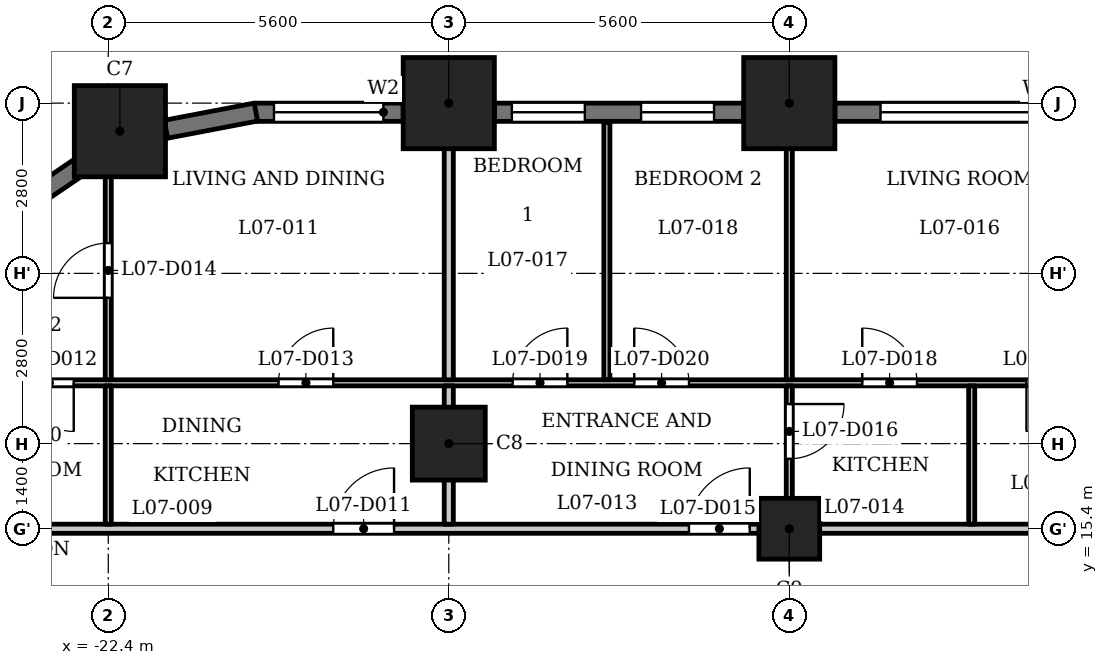
"""IFC4 building model, lengths in metres.
Left out: names, types, materials, properties, quantities, classifications, styles, units other than length and angle.
Written with IfcOpenShell. Run it as: python <this file> out.ifc"""

import sys

from ifc_helpers import new_model, si_unit, direction, frame, frame_2d, origin, origin_2d, place, context, subcontext, project, spatial, rectangle, extrude, element, fill, save


model = new_model("IFC4")
c1 = context("Model", 3, precision=1e-05, world=origin(), true_north=direction((0.0, 1.0)))
c2 = subcontext(c1, "Body", "Model", "MODEL_VIEW")
j1 = project(units=[si_unit("LENGTHUNIT", "METRE"), si_unit("PLANEANGLEUNIT", "RADIAN")], contexts=[c1])
p1 = place(None, origin())
s1 = spatial("IfcSite", under=j1, at=p1, CompositionType="ELEMENT")
p2 = place(p1, origin())
s2 = spatial("IfcBuilding", under=s1, at=p2, CompositionType="ELEMENT")
p3 = place(p2, frame((0.0, 0.0, 34.0)))
s3 = spatial("IfcBuildingStorey", under=s2, at=p3, CompositionType="ELEMENT", Elevation=34.0)
for number, where, z_axis, x_axis in (
    (1, (-11.2, 22.4, 0.0), (0.0, 0.0, 1.0), (1.0, 0.0, 0.0)),
    (2, (-16.8, 22.4, 0.0), (0.0, 0.0, 1.0), (1.0, 0.0, 0.0)),
    (3, (-22.209, 21.938, 0.0), (0.0, 0.0, 1.0), (1.0, 0.0, 0.0)),
):
    element("IfcColumn", number, at=place(p3, frame(where, z_axis=z_axis, x_axis=x_axis)), inside=s3, PredefinedType="COLUMN", context=c2, shape_type="SweptSolid", body=[
        extrude(rectangle(XDim=1.5, YDim=1.5, at=origin_2d()), origin(), (0.0, 0.0, 1.0), 3.5),
    ])
p4 = place(p3, frame((-16.8, 16.8, 0.0), z_axis=(0.0, 0.0, 1.0), x_axis=(1.0, 0.0, 0.0)))
e4 = element("IfcColumn", 4, at=p4, inside=s3, PredefinedType="COLUMN", context=c2, shape_type="SweptSolid", body=[
    extrude(rectangle(XDim=1.2, YDim=1.2, at=origin_2d()), origin(), (0.0, 0.0, 1.0), 3.5),
])
p5 = place(p3, frame((-11.2, 15.4, 0.0), z_axis=(0.0, 0.0, 1.0), x_axis=(1.0, 0.0, 0.0)))
e5 = element("IfcColumn", 5, at=p5, inside=s3, PredefinedType="COLUMN", context=c2, shape_type="SweptSolid", body=[
    extrude(rectangle(XDim=1.0, YDim=1.0, at=origin_2d()), origin(), (0.0, 0.0, 1.0), 3.5),
])
p6 = place(p3, frame((-6.35, 22.25, 0.0), z_axis=(0.0, 0.0, 1.0), x_axis=(-1.0, 0.0, 0.0)))
e6 = element("IfcWall", 6, at=p6, inside=s3, PredefinedType="SOLIDWALL", context=c2, shape_type="SweptSolid", body=[
    extrude(rectangle(XDim=4.1, YDim=0.3, at=frame_2d((2.05, 0.0))), origin(), (0.0, 0.0, 1.0), 2.35),
])
p7 = place(p6, frame((0.75, 0.0, 0.9)))
e7 = element("IfcOpeningElement", 7, at=p7, cuts=e6, PredefinedType="OPENING", context=c2, shape_type="SweptSolid", body=[
    extrude(rectangle(XDim=2.6, YDim=1.25, at=frame_2d((1.3, 0.625))), frame((0.0, 0.16, 0.0), z_axis=(0.0, -1.0, 0.0), x_axis=(1.0, 0.0, 0.0)), (0.0, 0.0, 1.0), 0.32),
])
p8 = place(p3, frame((-11.95, 22.25, 0.0), z_axis=(0.0, 0.0, 1.0), x_axis=(-1.0, 0.0, 0.0)))
e8 = element("IfcWall", 8, at=p8, inside=s3, PredefinedType="SOLIDWALL", context=c2, shape_type="SweptSolid", body=[
    extrude(rectangle(XDim=4.1, YDim=0.3, at=frame_2d((2.05, 0.0))), origin(), (0.0, 0.0, 1.0), 2.35),
])
p9 = place(p8, frame((0.488, 0.0, 0.6)))
e9 = element("IfcOpeningElement", 9, at=p9, cuts=e8, PredefinedType="OPENING", context=c2, shape_type="SweptSolid", body=[
    extrude(rectangle(XDim=1.2, YDim=1.55, at=frame_2d((0.6, 0.775))), frame((0.0, 0.16, 0.0), z_axis=(0.0, -1.0, 0.0), x_axis=(1.0, 0.0, 0.0)), (0.0, 0.0, 1.0), 0.32),
])
p10 = place(p8, frame((2.613, 0.0, 0.6)))
e10 = element("IfcOpeningElement", 10, at=p10, cuts=e8, PredefinedType="OPENING", context=c2, shape_type="SweptSolid", body=[
    extrude(rectangle(XDim=1.2, YDim=1.55, at=frame_2d((0.6, 0.775))), frame((0.0, 0.16, 0.0), z_axis=(0.0, -1.0, 0.0), x_axis=(1.0, 0.0, 0.0)), (0.0, 0.0, 1.0), 0.32),
])
p11 = place(p3, frame((-17.55, 22.25, 0.0), z_axis=(0.0, 0.0, 1.0), x_axis=(-1.0, 0.0, 0.0)))
e11 = element("IfcWall", 11, at=p11, inside=s3, PredefinedType="SOLIDWALL", context=c2, shape_type="SweptSolid", body=[
    extrude(rectangle(XDim=2.45, YDim=0.3, at=frame_2d((1.225, 0.0))), origin(), (0.0, 0.0, 1.0), 2.35),
])
p12 = place(p11, frame((0.325, 0.0, 0.9)))
e12 = element("IfcOpeningElement", 12, at=p12, cuts=e11, PredefinedType="OPENING", context=c2, shape_type="SweptSolid", body=[
    extrude(rectangle(XDim=1.8, YDim=1.25, at=frame_2d((0.9, 0.625))), frame((0.0, 0.16, 0.0), z_axis=(0.0, -1.0, 0.0), x_axis=(1.0, 0.0, 0.0)), (0.0, 0.0, 1.0), 0.32),
])
for number, where, z_axis, x_axis in (
    (13, (-19.972, 22.253, 0.0), (0.0, 0.0, 1.0), (-0.982, -0.187, 0.0)),
    (14, (-22.767, 21.426, 0.0), (0.0, 0.0, 1.0), (-0.827, -0.562, 0.0)),
):
    element("IfcWall", number, at=place(p3, frame(where, z_axis=z_axis, x_axis=x_axis)), inside=s3, PredefinedType="SOLIDWALL", context=c2, shape_type="SweptSolid", body=[
        extrude(rectangle(XDim=1.506, YDim=0.3, at=frame_2d((0.753, 0.0))), origin(), (0.0, 0.0, 1.0), 2.35),
    ])
p13 = place(p3, frame((-27.484, 15.4, 0.0), z_axis=(0.0, 0.0, 1.0), x_axis=(1.0, 0.0, 0.0)))
e15 = element("IfcWall", 15, at=p13, inside=s3, PredefinedType="PARTITIONING", context=c2, shape_type="SweptSolid", body=[
    extrude(rectangle(XDim=54.968, YDim=0.15, at=frame_2d((27.484, 0.0))), origin(), (0.0, 0.0, 1.0), 3.2),
])
p14 = place(p13, frame((8.784, 0.0, 0.0)))
e16 = element("IfcOpeningElement", 16, at=p14, cuts=e15, PredefinedType="OPENING", context=c2, shape_type="SweptSolid", body=[
    extrude(rectangle(XDim=1.0, YDim=2.1, at=frame_2d((0.5, 1.05))), frame((0.0, 0.085, 0.0), z_axis=(0.0, -1.0, 0.0), x_axis=(1.0, 0.0, 0.0)), (0.0, 0.0, 1.0), 0.17),
])
p15 = place(p13, frame((14.634, 0.0, 0.0)))
e17 = element("IfcOpeningElement", 17, at=p15, cuts=e15, PredefinedType="OPENING", context=c2, shape_type="SweptSolid", body=[
    extrude(rectangle(XDim=1.0, YDim=2.1, at=frame_2d((0.5, 1.05))), frame((0.0, 0.085, 0.0), z_axis=(0.0, -1.0, 0.0), x_axis=(1.0, 0.0, 0.0)), (0.0, 0.0, 1.0), 0.17),
])
p16 = place(p13, frame((23.834, 0.0, 0.0)))
e18 = element("IfcOpeningElement", 18, at=p16, cuts=e15, PredefinedType="OPENING", context=c2, shape_type="SweptSolid", body=[
    extrude(rectangle(XDim=1.0, YDim=2.1, at=frame_2d((0.5, 1.05))), frame((0.0, 0.085, 0.0), z_axis=(0.0, -1.0, 0.0), x_axis=(1.0, 0.0, 0.0)), (0.0, 0.0, 1.0), 0.17),
])
p17 = place(p13, frame((28.184, 0.0, 0.0)))
e19 = element("IfcOpeningElement", 19, at=p17, cuts=e15, PredefinedType="OPENING", context=c2, shape_type="SweptSolid", body=[
    extrude(rectangle(XDim=1.0, YDim=2.1, at=frame_2d((0.5, 1.05))), frame((0.0, 0.085, 0.0), z_axis=(0.0, -1.0, 0.0), x_axis=(1.0, 0.0, 0.0)), (0.0, 0.0, 1.0), 0.17),
])
p18 = place(p13, frame((41.884, 0.0, 0.0)))
e20 = element("IfcOpeningElement", 20, at=p18, cuts=e15, PredefinedType="OPENING", context=c2, shape_type="SweptSolid", body=[
    extrude(rectangle(XDim=1.0, YDim=2.1, at=frame_2d((0.5, 1.05))), frame((0.0, 0.085, 0.0), z_axis=(0.0, -1.0, 0.0), x_axis=(1.0, 0.0, 0.0)), (0.0, 0.0, 1.0), 0.17),
])
p19 = place(p13, frame((48.234, 0.0, 0.0)))
e21 = element("IfcOpeningElement", 21, at=p19, cuts=e15, PredefinedType="OPENING", context=c2, shape_type="SweptSolid", body=[
    extrude(rectangle(XDim=1.0, YDim=2.1, at=frame_2d((0.5, 1.05))), frame((0.0, 0.085, 0.0), z_axis=(0.0, -1.0, 0.0), x_axis=(1.0, 0.0, 0.0)), (0.0, 0.0, 1.0), 0.17),
])
p20 = place(p3, frame((-26.732, 17.8, 0.0), z_axis=(0.0, 0.0, 1.0), x_axis=(1.0, 0.0, 0.0)))
e22 = element("IfcWall", 22, at=p20, inside=s3, PredefinedType="PARTITIONING", context=c2, shape_type="SweptSolid", body=[
    extrude(rectangle(XDim=53.126, YDim=0.1, at=frame_2d((26.563, 0.0))), origin(), (0.0, 0.0, 1.0), 3.2),
])
p21 = place(p20, frame((2.964, 0.0, 0.0)))
e23 = element("IfcOpeningElement", 23, at=p21, cuts=e22, PredefinedType="OPENING", context=c2, shape_type="SweptSolid", body=[
    extrude(rectangle(XDim=0.8, YDim=2.1, at=frame_2d((0.4, 1.05))), frame((0.0, 0.06, 0.0), z_axis=(0.0, -1.0, 0.0), x_axis=(1.0, 0.0, 0.0)), (0.0, 0.0, 1.0), 0.12),
])
p22 = place(p20, frame((7.132, 0.0, 0.0)))
e24 = element("IfcOpeningElement", 24, at=p22, cuts=e22, PredefinedType="OPENING", context=c2, shape_type="SweptSolid", body=[
    extrude(rectangle(XDim=0.9, YDim=2.1, at=frame_2d((0.45, 1.05))), frame((0.0, 0.06, 0.0), z_axis=(0.0, -1.0, 0.0), x_axis=(1.0, 0.0, 0.0)), (0.0, 0.0, 1.0), 0.12),
])
p23 = place(p20, frame((19.432, 0.0, 0.0)))
e25 = element("IfcOpeningElement", 25, at=p23, cuts=e22, PredefinedType="OPENING", context=c2, shape_type="SweptSolid", body=[
    extrude(rectangle(XDim=0.8, YDim=2.1, at=frame_2d((0.4, 1.05))), frame((0.0, 0.06, 0.0), z_axis=(0.0, -1.0, 0.0), x_axis=(1.0, 0.0, 0.0)), (0.0, 0.0, 1.0), 0.12),
])
p24 = place(p20, frame((16.732, 0.0, 0.0)))
e26 = element("IfcOpeningElement", 26, at=p24, cuts=e22, PredefinedType="OPENING", context=c2, shape_type="SweptSolid", body=[
    extrude(rectangle(XDim=0.9, YDim=2.1, at=frame_2d((0.45, 1.05))), frame((0.0, 0.06, 0.0), z_axis=(0.0, -1.0, 0.0), x_axis=(1.0, 0.0, 0.0)), (0.0, 0.0, 1.0), 0.12),
])
p25 = place(p20, frame((10.982, 0.0, 0.0)))
e27 = element("IfcOpeningElement", 27, at=p25, cuts=e22, PredefinedType="OPENING", context=c2, shape_type="SweptSolid", body=[
    extrude(rectangle(XDim=0.9, YDim=2.1, at=frame_2d((0.45, 1.05))), frame((0.0, 0.06, 0.0), z_axis=(0.0, -1.0, 0.0), x_axis=(1.0, 0.0, 0.0)), (0.0, 0.0, 1.0), 0.12),
])
p26 = place(p20, frame((12.982, 0.0, 0.0)))
e28 = element("IfcOpeningElement", 28, at=p26, cuts=e22, PredefinedType="OPENING", context=c2, shape_type="SweptSolid", body=[
    extrude(rectangle(XDim=0.9, YDim=2.1, at=frame_2d((0.45, 1.05))), frame((0.0, 0.06, 0.0), z_axis=(0.0, -1.0, 0.0), x_axis=(1.0, 0.0, 0.0)), (0.0, 0.0, 1.0), 0.12),
])
p27 = place(p20, frame((25.382, 0.0, 0.0)))
e29 = element("IfcOpeningElement", 29, at=p27, cuts=e22, PredefinedType="OPENING", context=c2, shape_type="SweptSolid", body=[
    extrude(rectangle(XDim=0.8, YDim=2.1, at=frame_2d((0.4, 1.05))), frame((0.0, 0.06, 0.0), z_axis=(0.0, -1.0, 0.0), x_axis=(1.0, 0.0, 0.0)), (0.0, 0.0, 1.0), 0.12),
])
p28 = place(p20, frame((22.182, 0.0, 0.0)))
e30 = element("IfcOpeningElement", 30, at=p28, cuts=e22, PredefinedType="OPENING", context=c2, shape_type="SweptSolid", body=[
    extrude(rectangle(XDim=0.9, YDim=2.1, at=frame_2d((0.45, 1.05))), frame((0.0, 0.06, 0.0), z_axis=(0.0, -1.0, 0.0), x_axis=(1.0, 0.0, 0.0)), (0.0, 0.0, 1.0), 0.12),
])
p29 = place(p20, frame((36.232, 0.0, 0.0)))
e31 = element("IfcOpeningElement", 31, at=p29, cuts=e22, PredefinedType="OPENING", context=c2, shape_type="SweptSolid", body=[
    extrude(rectangle(XDim=0.8, YDim=2.1, at=frame_2d((0.4, 1.05))), frame((0.0, 0.06, 0.0), z_axis=(0.0, -1.0, 0.0), x_axis=(1.0, 0.0, 0.0)), (0.0, 0.0, 1.0), 0.12),
])
p30 = place(p20, frame((33.782, 0.0, 0.0)))
e32 = element("IfcOpeningElement", 32, at=p30, cuts=e22, PredefinedType="OPENING", context=c2, shape_type="SweptSolid", body=[
    extrude(rectangle(XDim=0.9, YDim=2.1, at=frame_2d((0.45, 1.05))), frame((0.0, 0.06, 0.0), z_axis=(0.0, -1.0, 0.0), x_axis=(1.0, 0.0, 0.0)), (0.0, 0.0, 1.0), 0.12),
])
p31 = place(p20, frame((27.282, 0.0, 0.0)))
e33 = element("IfcOpeningElement", 33, at=p31, cuts=e22, PredefinedType="OPENING", context=c2, shape_type="SweptSolid", body=[
    extrude(rectangle(XDim=0.9, YDim=2.1, at=frame_2d((0.45, 1.05))), frame((0.0, 0.06, 0.0), z_axis=(0.0, -1.0, 0.0), x_axis=(1.0, 0.0, 0.0)), (0.0, 0.0, 1.0), 0.12),
])
p32 = place(p20, frame((30.282, 0.0, 0.0)))
e34 = element("IfcOpeningElement", 34, at=p32, cuts=e22, PredefinedType="OPENING", context=c2, shape_type="SweptSolid", body=[
    extrude(rectangle(XDim=0.9, YDim=2.1, at=frame_2d((0.45, 1.05))), frame((0.0, 0.06, 0.0), z_axis=(0.0, -1.0, 0.0), x_axis=(1.0, 0.0, 0.0)), (0.0, 0.0, 1.0), 0.12),
])
p33 = place(p20, frame((38.582, 0.0, 0.0)))
e35 = element("IfcOpeningElement", 35, at=p33, cuts=e22, PredefinedType="OPENING", context=c2, shape_type="SweptSolid", body=[
    extrude(rectangle(XDim=0.8, YDim=2.1, at=frame_2d((0.4, 1.05))), frame((0.0, 0.06, 0.0), z_axis=(0.0, -1.0, 0.0), x_axis=(1.0, 0.0, 0.0)), (0.0, 0.0, 1.0), 0.12),
])
p34 = place(p20, frame((41.232, 0.0, 0.0)))
e36 = element("IfcOpeningElement", 36, at=p34, cuts=e22, PredefinedType="OPENING", context=c2, shape_type="SweptSolid", body=[
    extrude(rectangle(XDim=0.9, YDim=2.1, at=frame_2d((0.45, 1.05))), frame((0.0, 0.06, 0.0), z_axis=(0.0, -1.0, 0.0), x_axis=(1.0, 0.0, 0.0)), (0.0, 0.0, 1.0), 0.12),
])
p35 = place(p20, frame((51.532, 0.0, 0.0)))
e37 = element("IfcOpeningElement", 37, at=p35, cuts=e22, PredefinedType="OPENING", context=c2, shape_type="SweptSolid", body=[
    extrude(rectangle(XDim=0.8, YDim=2.1, at=frame_2d((0.4, 1.05))), frame((0.0, 0.06, 0.0), z_axis=(0.0, -1.0, 0.0), x_axis=(1.0, 0.0, 0.0)), (0.0, 0.0, 1.0), 0.12),
])
p36 = place(p20, frame((46.582, 0.0, 0.0)))
e38 = element("IfcOpeningElement", 38, at=p36, cuts=e22, PredefinedType="OPENING", context=c2, shape_type="SweptSolid", body=[
    extrude(rectangle(XDim=0.9, YDim=2.1, at=frame_2d((0.45, 1.05))), frame((0.0, 0.06, 0.0), z_axis=(0.0, -1.0, 0.0), x_axis=(1.0, 0.0, 0.0)), (0.0, 0.0, 1.0), 0.12),
])
p37 = place(p3, frame((-22.4, 15.475, 0.0), z_axis=(0.0, 0.0, 1.0), x_axis=(0.0, 1.0, 0.0)))
e39 = element("IfcWall", 39, at=p37, inside=s3, PredefinedType="PARTITIONING", context=c2, shape_type="SweptSolid", body=[
    extrude(rectangle(XDim=2.275, YDim=0.1, at=frame_2d((1.137, 0.0))), origin(), (0.0, 0.0, 1.0), 3.2),
])
p38 = place(p3, frame((-22.4, 17.85, 0.0), z_axis=(0.0, 0.0, 1.0), x_axis=(0.0, 1.0, 0.0)))
e40 = element("IfcWall", 40, at=p38, inside=s3, PredefinedType="PARTITIONING", context=c2, shape_type="SweptSolid", body=[
    extrude(rectangle(XDim=3.87, YDim=0.1, at=frame_2d((1.935, 0.0))), origin(), (0.0, 0.0, 1.0), 3.2),
])
p39 = place(p38, frame((1.348, 0.0, 0.0)))
e41 = element("IfcOpeningElement", 41, at=p39, cuts=e40, PredefinedType="OPENING", context=c2, shape_type="SweptSolid", body=[
    extrude(rectangle(XDim=0.9, YDim=2.1, at=frame_2d((0.45, 1.05))), frame((0.0, 0.06, 0.0), z_axis=(0.0, -1.0, 0.0), x_axis=(1.0, 0.0, 0.0)), (0.0, 0.0, 1.0), 0.12),
])
p40 = place(p3, frame((-16.8, 15.475, 0.0), z_axis=(0.0, 0.0, 1.0), x_axis=(0.0, 1.0, 0.0)))
e42 = element("IfcWall", 42, at=p40, inside=s3, PredefinedType="PARTITIONING", context=c2, shape_type="SweptSolid", body=[
    extrude(rectangle(XDim=2.275, YDim=0.15, at=frame_2d((1.137, 0.0))), origin(), (0.0, 0.0, 1.0), 3.2),
])
p41 = place(p3, frame((-16.8, 17.85, 0.0), z_axis=(0.0, 0.0, 1.0), x_axis=(0.0, 1.0, 0.0)))
e43 = element("IfcWall", 43, at=p41, inside=s3, PredefinedType="PARTITIONING", context=c2, shape_type="SweptSolid", body=[
    extrude(rectangle(XDim=5.28, YDim=0.15, at=frame_2d((2.64, 0.0))), origin(), (0.0, 0.0, 1.0), 3.2),
])
p42 = place(p3, frame((-14.2, 17.85, 0.0), z_axis=(0.0, 0.0, 1.0), x_axis=(0.0, 1.0, 0.0)))
e44 = element("IfcWall", 44, at=p42, inside=s3, PredefinedType="PARTITIONING", context=c2, shape_type="SweptSolid", body=[
    extrude(rectangle(XDim=4.23, YDim=0.1, at=frame_2d((2.115, 0.0))), origin(), (0.0, 0.0, 1.0), 3.2),
])
p43 = place(p3, frame((-11.2, 15.475, 0.0), z_axis=(0.0, 0.0, 1.0), x_axis=(0.0, 1.0, 0.0)))
e45 = element("IfcWall", 45, at=p43, inside=s3, PredefinedType="PARTITIONING", context=c2, shape_type="SweptSolid", body=[
    extrude(rectangle(XDim=2.275, YDim=0.1, at=frame_2d((1.137, 0.0))), origin(), (0.0, 0.0, 1.0), 3.2),
])
p44 = place(p43, frame((1.076, 0.0, 0.0)))
e46 = element("IfcOpeningElement", 46, at=p44, cuts=e45, PredefinedType="OPENING", context=c2, shape_type="SweptSolid", body=[
    extrude(rectangle(XDim=0.9, YDim=2.1, at=frame_2d((0.45, 1.05))), frame((0.0, 0.06, 0.0), z_axis=(0.0, -1.0, 0.0), x_axis=(1.0, 0.0, 0.0)), (0.0, 0.0, 1.0), 0.12),
])
p45 = place(p3, frame((-11.2, 17.85, 0.0), z_axis=(0.0, 0.0, 1.0), x_axis=(0.0, 1.0, 0.0)))
e47 = element("IfcWall", 47, at=p45, inside=s3, PredefinedType="PARTITIONING", context=c2, shape_type="SweptSolid", body=[
    extrude(rectangle(XDim=5.28, YDim=0.1, at=frame_2d((2.64, 0.0))), origin(), (0.0, 0.0, 1.0), 3.2),
])
p46 = place(p3, frame((-8.2, 15.475, 0.0), z_axis=(0.0, 0.0, 1.0), x_axis=(0.0, 1.0, 0.0)))
e48 = element("IfcWall", 48, at=p46, inside=s3, PredefinedType="PARTITIONING", context=c2, shape_type="SweptSolid", body=[
    extrude(rectangle(XDim=2.275, YDim=0.1, at=frame_2d((1.137, 0.0))), origin(), (0.0, 0.0, 1.0), 3.2),
])
p47 = place(p14, origin())
e49 = element("IfcDoor", 49, at=p47, inside=s3, OperationType="SINGLE_SWING_LEFT", PredefinedType="DOOR", context=c2, shape_type="SweptSolid", body=[
    extrude(rectangle(XDim=1.0, YDim=2.1, at=frame_2d((0.5, 1.05))), frame((0.0, 0.025, 0.0), z_axis=(0.0, -1.0, 0.0), x_axis=(1.0, 0.0, 0.0)), (0.0, 0.0, 1.0), 0.05),
])
fill(e16, e49)
p48 = place(p21, origin())
e50 = element("IfcDoor", 50, at=p48, inside=s3, OperationType="SINGLE_SWING_RIGHT", PredefinedType="DOOR", context=c2, shape_type="SweptSolid", body=[
    extrude(rectangle(XDim=0.8, YDim=2.1, at=frame_2d((0.4, 1.05))), frame((0.0, 0.025, 0.0), z_axis=(0.0, -1.0, 0.0), x_axis=(1.0, 0.0, 0.0)), (0.0, 0.0, 1.0), 0.05),
])
fill(e23, e50)
p49 = place(p22, origin())
e51 = element("IfcDoor", 51, at=p49, inside=s3, OperationType="SINGLE_SWING_LEFT", PredefinedType="DOOR", context=c2, shape_type="SweptSolid", body=[
    extrude(rectangle(XDim=0.9, YDim=2.1, at=frame_2d((0.45, 1.05))), frame((0.0, 0.025, 0.0), z_axis=(0.0, -1.0, 0.0), x_axis=(1.0, 0.0, 0.0)), (0.0, 0.0, 1.0), 0.05),
])
fill(e24, e51)
p50 = place(p39, origin())
e52 = element("IfcDoor", 52, at=p50, inside=s3, OperationType="SINGLE_SWING_RIGHT", PredefinedType="DOOR", context=c2, shape_type="SweptSolid", body=[
    extrude(rectangle(XDim=0.9, YDim=2.1, at=frame_2d((0.45, 1.05))), frame((0.0, 0.025, 0.0), z_axis=(0.0, -1.0, 0.0), x_axis=(1.0, 0.0, 0.0)), (0.0, 0.0, 1.0), 0.05),
])
fill(e41, e52)
p51 = place(p15, origin())
e53 = element("IfcDoor", 53, at=p51, inside=s3, OperationType="SINGLE_SWING_LEFT", PredefinedType="DOOR", context=c2, shape_type="SweptSolid", body=[
    extrude(rectangle(XDim=1.0, YDim=2.1, at=frame_2d((0.5, 1.05))), frame((0.0, 0.025, 0.0), z_axis=(0.0, -1.0, 0.0), x_axis=(1.0, 0.0, 0.0)), (0.0, 0.0, 1.0), 0.05),
])
fill(e17, e53)
p52 = place(p44, origin())
e54 = element("IfcDoor", 54, at=p52, inside=s3, OperationType="SINGLE_SWING_RIGHT", PredefinedType="DOOR", context=c2, shape_type="SweptSolid", body=[
    extrude(rectangle(XDim=0.9, YDim=2.1, at=frame_2d((0.45, 1.05))), frame((0.0, 0.025, 0.0), z_axis=(0.0, -1.0, 0.0), x_axis=(1.0, 0.0, 0.0)), (0.0, 0.0, 1.0), 0.05),
])
fill(e46, e54)
p53 = place(p23, origin())
e55 = element("IfcDoor", 55, at=p53, inside=s3, OperationType="SINGLE_SWING_LEFT", PredefinedType="DOOR", context=c2, shape_type="SweptSolid", body=[
    extrude(rectangle(XDim=0.8, YDim=2.1, at=frame_2d((0.4, 1.05))), frame((0.0, 0.025, 0.0), z_axis=(0.0, -1.0, 0.0), x_axis=(1.0, 0.0, 0.0)), (0.0, 0.0, 1.0), 0.05),
])
fill(e25, e55)
p54 = place(p24, origin())
e56 = element("IfcDoor", 56, at=p54, inside=s3, OperationType="SINGLE_SWING_RIGHT", PredefinedType="DOOR", context=c2, shape_type="SweptSolid", body=[
    extrude(rectangle(XDim=0.9, YDim=2.1, at=frame_2d((0.45, 1.05))), frame((0.0, 0.025, 0.0), z_axis=(0.0, -1.0, 0.0), x_axis=(1.0, 0.0, 0.0)), (0.0, 0.0, 1.0), 0.05),
])
fill(e26, e56)
p55 = place(p25, origin())
e57 = element("IfcDoor", 57, at=p55, inside=s3, OperationType="SINGLE_SWING_LEFT", PredefinedType="DOOR", context=c2, shape_type="SweptSolid", body=[
    extrude(rectangle(XDim=0.9, YDim=2.1, at=frame_2d((0.45, 1.05))), frame((0.0, 0.025, 0.0), z_axis=(0.0, -1.0, 0.0), x_axis=(1.0, 0.0, 0.0)), (0.0, 0.0, 1.0), 0.05),
])
fill(e27, e57)
p56 = place(p26, origin())
e58 = element("IfcDoor", 58, at=p56, inside=s3, OperationType="SINGLE_SWING_RIGHT", PredefinedType="DOOR", context=c2, shape_type="SweptSolid", body=[
    extrude(rectangle(XDim=0.9, YDim=2.1, at=frame_2d((0.45, 1.05))), frame((0.0, 0.025, 0.0), z_axis=(0.0, -1.0, 0.0), x_axis=(1.0, 0.0, 0.0)), (0.0, 0.0, 1.0), 0.05),
])
fill(e28, e58)
p57 = place(p7, origin())
e59 = element("IfcWindow", 59, at=p57, inside=s3, PartitioningType="SINGLE_PANEL", PredefinedType="WINDOW", context=c2, shape_type="SweptSolid", body=[
    extrude(rectangle(XDim=2.6, YDim=1.25, at=frame_2d((1.3, 0.625))), frame((0.0, 0.03, 0.0), z_axis=(0.0, -1.0, 0.0), x_axis=(1.0, 0.0, 0.0)), (0.0, 0.0, 1.0), 0.06),
])
fill(e7, e59)
p58 = place(p9, origin())
e60 = element("IfcWindow", 60, at=p58, inside=s3, PartitioningType="SINGLE_PANEL", PredefinedType="WINDOW", context=c2, shape_type="SweptSolid", body=[
    extrude(rectangle(XDim=1.2, YDim=1.55, at=frame_2d((0.6, 0.775))), frame((0.0, 0.03, 0.0), z_axis=(0.0, -1.0, 0.0), x_axis=(1.0, 0.0, 0.0)), (0.0, 0.0, 1.0), 0.06),
])
fill(e9, e60)
p59 = place(p10, origin())
e61 = element("IfcWindow", 61, at=p59, inside=s3, PartitioningType="SINGLE_PANEL", PredefinedType="WINDOW", context=c2, shape_type="SweptSolid", body=[
    extrude(rectangle(XDim=1.2, YDim=1.55, at=frame_2d((0.6, 0.775))), frame((0.0, 0.03, 0.0), z_axis=(0.0, -1.0, 0.0), x_axis=(1.0, 0.0, 0.0)), (0.0, 0.0, 1.0), 0.06),
])
fill(e10, e61)
p60 = place(p12, origin())
e62 = element("IfcWindow", 62, at=p60, inside=s3, PartitioningType="SINGLE_PANEL", PredefinedType="WINDOW", context=c2, shape_type="SweptSolid", body=[
    extrude(rectangle(XDim=1.8, YDim=1.25, at=frame_2d((0.9, 0.625))), frame((0.0, 0.03, 0.0), z_axis=(0.0, -1.0, 0.0), x_axis=(1.0, 0.0, 0.0)), (0.0, 0.0, 1.0), 0.06),
])
fill(e12, e62)
save(model, sys.argv[1])
